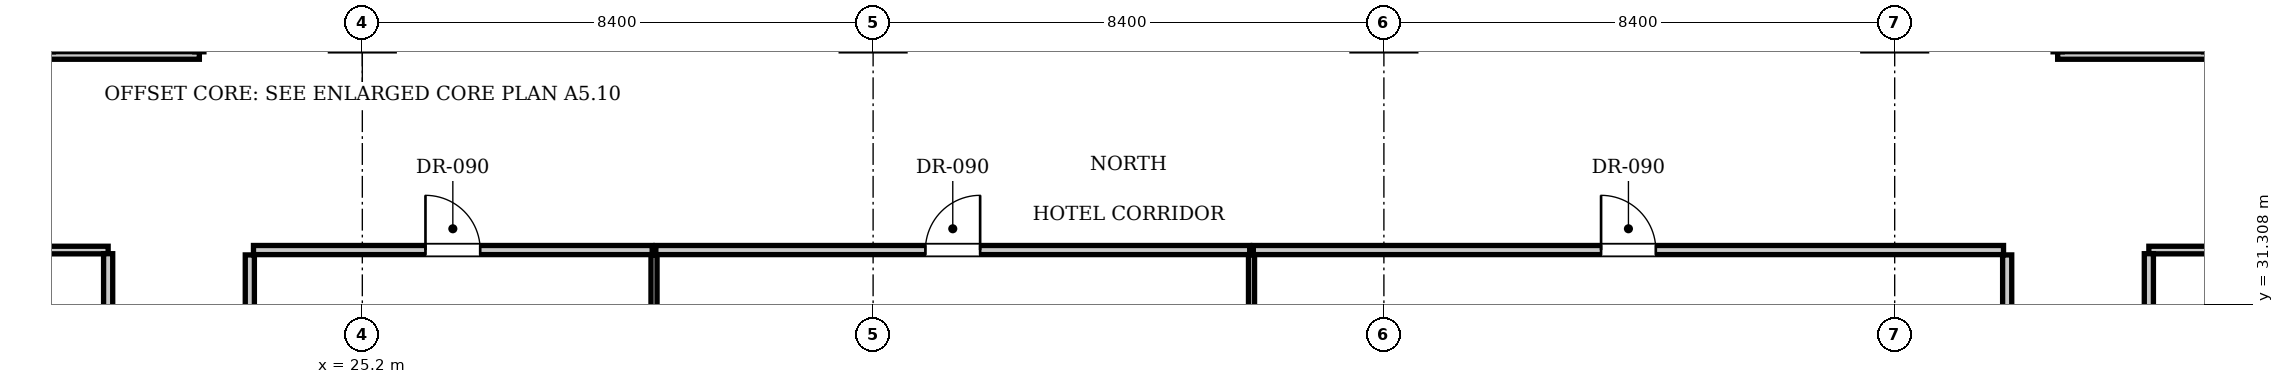
"""IFC4 building model, lengths in metres.
Left out: names, types, materials, properties, quantities, classifications, styles, units other than length and angle.
Written with IfcOpenShell. Run it as: python <this file> out.ifc"""

import sys

from ifc_helpers import new_model, si_unit, direction, frame, frame_2d, origin, place, context, subcontext, project, spatial, rectangle, extrude, element, fill, save


model = new_model("IFC4")
c1 = context("Model", 3, precision=1e-05, world=origin(), true_north=direction((0.0, 1.0)))
c2 = subcontext(c1, "Body", "Model", "MODEL_VIEW")
j1 = project(units=[si_unit("LENGTHUNIT", "METRE"), si_unit("PLANEANGLEUNIT", "RADIAN")], contexts=[c1])
p1 = place(None, origin())
s1 = spatial("IfcSite", under=j1, at=p1, CompositionType="ELEMENT")
p2 = place(p1, origin())
s2 = spatial("IfcBuilding", under=s1, at=p2, CompositionType="ELEMENT")
p3 = place(p2, frame((0.0, 0.0, 46.2)))
s3 = spatial("IfcBuildingStorey", under=s2, at=p3, CompositionType="ELEMENT", Elevation=46.2)
for number, where, z_axis, x_axis in (
    (1, (23.35, 24.58, 0.0), (0.0, 0.0, 1.0), (0.0, 1.0, 0.0)),
    (2, (52.25, 24.58, 0.0), (0.0, 0.0, 1.0), (0.0, 1.0, 0.0)),
):
    element("IfcWall", number, at=place(p3, frame(where, z_axis=z_axis, x_axis=x_axis)), inside=s3, PredefinedType="PARTITIONING", context=c2, shape_type="SweptSolid", body=[
        extrude(rectangle(XDim=7.54, YDim=0.15, at=frame_2d((3.77, 0.0))), origin(), (0.0, 0.0, 1.0), 3.61),
    ])
p4 = place(p3, frame((23.41, 32.2, 0.0), z_axis=(0.0, 0.0, 1.0), x_axis=(1.0, 0.0, 0.0)))
e3 = element("IfcWall", 3, at=p4, inside=s3, PredefinedType="PARTITIONING", context=c2, shape_type="SweptSolid", body=[
    extrude(rectangle(XDim=6.557, YDim=0.15, at=frame_2d((3.279, 0.0))), origin(), (0.0, 0.0, 1.0), 3.61),
])
p5 = place(p4, frame((2.829, 0.0, 0.0)))
e4 = element("IfcOpeningElement", 4, at=p5, cuts=e3, PredefinedType="OPENING", context=c2, shape_type="SweptSolid", body=[
    extrude(rectangle(XDim=0.9, YDim=2.1, at=frame_2d((0.45, 1.05))), frame((0.0, 0.085, 0.0), z_axis=(0.0, -1.0, 0.0), x_axis=(1.0, 0.0, 0.0)), (0.0, 0.0, 1.0), 0.17),
])
p6 = place(p3, frame((29.997, 24.58, 0.0), z_axis=(0.0, 0.0, 1.0), x_axis=(0.0, 1.0, 0.0)))
e5 = element("IfcWall", 5, at=p6, inside=s3, PredefinedType="PARTITIONING", context=c2, shape_type="SweptSolid", body=[
    extrude(rectangle(XDim=7.54, YDim=0.1, at=frame_2d((3.77, 0.0))), origin(), (0.0, 0.0, 1.0), 3.61),
])
p7 = place(p3, frame((30.027, 32.2, 0.0), z_axis=(0.0, 0.0, 1.0), x_axis=(1.0, 0.0, 0.0)))
e6 = element("IfcWall", 6, at=p7, inside=s3, PredefinedType="PARTITIONING", context=c2, shape_type="SweptSolid", body=[
    extrude(rectangle(XDim=9.766, YDim=0.15, at=frame_2d((4.883, 0.0))), origin(), (0.0, 0.0, 1.0), 3.61),
])
p8 = place(p7, frame((4.433, 0.0, 0.0)))
e7 = element("IfcOpeningElement", 7, at=p8, cuts=e6, PredefinedType="OPENING", context=c2, shape_type="SweptSolid", body=[
    extrude(rectangle(XDim=0.9, YDim=2.1, at=frame_2d((0.45, 1.05))), frame((0.0, 0.085, 0.0), z_axis=(0.0, -1.0, 0.0), x_axis=(1.0, 0.0, 0.0)), (0.0, 0.0, 1.0), 0.17),
])
p9 = place(p3, frame((39.823, 24.58, 0.0), z_axis=(0.0, 0.0, 1.0), x_axis=(0.0, 1.0, 0.0)))
e8 = element("IfcWall", 8, at=p9, inside=s3, PredefinedType="PARTITIONING", context=c2, shape_type="SweptSolid", body=[
    extrude(rectangle(XDim=7.54, YDim=0.1, at=frame_2d((3.77, 0.0))), origin(), (0.0, 0.0, 1.0), 3.61),
])
p10 = place(p3, frame((39.853, 32.2, 0.0), z_axis=(0.0, 0.0, 1.0), x_axis=(1.0, 0.0, 0.0)))
e9 = element("IfcWall", 9, at=p10, inside=s3, PredefinedType="PARTITIONING", context=c2, shape_type="SweptSolid", body=[
    extrude(rectangle(XDim=12.337, YDim=0.15, at=frame_2d((6.168, 0.0))), origin(), (0.0, 0.0, 1.0), 3.61),
])
p11 = place(p10, frame((5.719, 0.0, 0.0)))
e10 = element("IfcOpeningElement", 10, at=p11, cuts=e9, PredefinedType="OPENING", context=c2, shape_type="SweptSolid", body=[
    extrude(rectangle(XDim=0.9, YDim=2.1, at=frame_2d((0.45, 1.05))), frame((0.0, 0.085, 0.0), z_axis=(0.0, -1.0, 0.0), x_axis=(1.0, 0.0, 0.0)), (0.0, 0.0, 1.0), 0.17),
])
p12 = place(p3, frame((10.9, 32.2, 0.0), z_axis=(0.0, 0.0, 1.0), x_axis=(1.0, 0.0, 0.0)))
e11 = element("IfcWall", 11, at=p12, inside=s3, PredefinedType="PARTITIONING", context=c2, shape_type="SweptSolid", body=[
    extrude(rectangle(XDim=10.12, YDim=0.125, at=frame_2d((5.06, 0.0))), origin(), (0.0, 0.0, 1.0), 3.61),
])
p13 = place(p3, frame((54.58, 32.2, 0.0), z_axis=(0.0, 0.0, 1.0), x_axis=(1.0, 0.0, 0.0)))
e12 = element("IfcWall", 12, at=p13, inside=s3, PredefinedType="PARTITIONING", context=c2, shape_type="SweptSolid", body=[
    extrude(rectangle(XDim=10.12, YDim=0.125, at=frame_2d((5.06, 0.0))), origin(), (0.0, 0.0, 1.0), 3.61),
])
p14 = place(p3, frame((21.02, 30.25, 0.0), z_axis=(0.0, 0.0, 1.0), x_axis=(0.0, 1.0, 0.0)))
e13 = element("IfcWall", 13, at=p14, inside=s3, PredefinedType="PARTITIONING", context=c2, shape_type="SweptSolid", body=[
    extrude(rectangle(XDim=1.89, YDim=0.15, at=frame_2d((0.945, 0.0))), origin(), (0.0, 0.0, 1.0), 3.457),
])
p15 = place(p3, frame((54.58, 30.25, 0.0), z_axis=(0.0, 0.0, 1.0), x_axis=(0.0, 1.0, 0.0)))
e14 = element("IfcWall", 14, at=p15, inside=s3, PredefinedType="PARTITIONING", context=c2, shape_type="SweptSolid", body=[
    extrude(rectangle(XDim=1.89, YDim=0.15, at=frame_2d((0.945, 0.0))), origin(), (0.0, 0.0, 1.0), 3.207),
])
p16 = place(p3, frame((10.9, 35.4, 0.0), z_axis=(0.0, 0.0, 1.0), x_axis=(1.0, 0.0, 0.0)))
e15 = element("IfcWall", 15, at=p16, inside=s3, PredefinedType="PARTITIONING", context=c2, shape_type="SweptSolid", body=[
    extrude(rectangle(XDim=11.62, YDim=0.125, at=frame_2d((5.81, 0.0))), origin(), (0.0, 0.0, 1.0), 3.61),
])
p17 = place(p3, frame((53.08, 35.4, 0.0), z_axis=(0.0, 0.0, 1.0), x_axis=(1.0, 0.0, 0.0)))
e16 = element("IfcWall", 16, at=p17, inside=s3, PredefinedType="PARTITIONING", context=c2, shape_type="SweptSolid", body=[
    extrude(rectangle(XDim=11.62, YDim=0.125, at=frame_2d((5.81, 0.0))), origin(), (0.0, 0.0, 1.0), 3.61),
])
p18 = place(p5, origin())
e17 = element("IfcDoor", 17, at=p18, inside=s3, OperationType="SINGLE_SWING_LEFT", PredefinedType="DOOR", context=c2, shape_type="SweptSolid", body=[
    extrude(rectangle(XDim=0.9, YDim=2.1, at=frame_2d((0.45, 1.05))), frame((0.0, 0.025, 0.0), z_axis=(0.0, -1.0, 0.0), x_axis=(1.0, 0.0, 0.0)), (0.0, 0.0, 1.0), 0.05),
])
fill(e4, e17)
p19 = place(p8, origin())
e18 = element("IfcDoor", 18, at=p19, inside=s3, OperationType="SINGLE_SWING_RIGHT", PredefinedType="DOOR", context=c2, shape_type="SweptSolid", body=[
    extrude(rectangle(XDim=0.9, YDim=2.1, at=frame_2d((0.45, 1.05))), frame((0.0, 0.025, 0.0), z_axis=(0.0, -1.0, 0.0), x_axis=(1.0, 0.0, 0.0)), (0.0, 0.0, 1.0), 0.05),
])
fill(e7, e18)
p20 = place(p11, origin())
e19 = element("IfcDoor", 19, at=p20, inside=s3, OperationType="SINGLE_SWING_LEFT", PredefinedType="DOOR", context=c2, shape_type="SweptSolid", body=[
    extrude(rectangle(XDim=0.9, YDim=2.1, at=frame_2d((0.45, 1.05))), frame((0.0, 0.025, 0.0), z_axis=(0.0, -1.0, 0.0), x_axis=(1.0, 0.0, 0.0)), (0.0, 0.0, 1.0), 0.05),
])
fill(e10, e19)
save(model, sys.argv[1])
